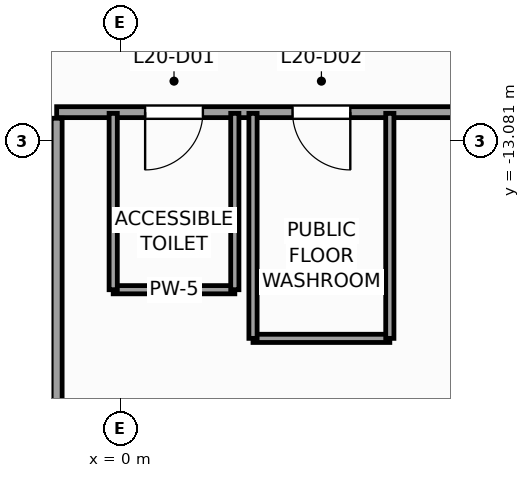
"""IFC4 building model, lengths in metres.
Left out: names, types, materials, properties, quantities, classifications, styles, units other than length and angle.
Written with IfcOpenShell. Run it as: python <this file> out.ifc"""

import sys

from ifc_helpers import new_model, si_unit, direction, frame, frame_2d, origin, place, context, subcontext, project, spatial, rectangle, extrude, source, transform, mapped, element, fill, save


model = new_model("IFC4")
c1 = context("Model", 3, precision=1e-05, world=origin(), true_north=direction((0.0, 1.0)))
c2 = subcontext(c1, "Body", "Model", "MODEL_VIEW")
j1 = project(units=[si_unit("LENGTHUNIT", "METRE"), si_unit("PLANEANGLEUNIT", "RADIAN")], contexts=[c1])
p1 = place(None, origin())
s1 = spatial("IfcSite", under=j1, at=p1, CompositionType="ELEMENT")
p2 = place(p1, origin())
s2 = spatial("IfcBuilding", under=s1, at=p2, CompositionType="ELEMENT")
p3 = place(p2, frame((0.0, 0.0, 87.2)))
s3 = spatial("IfcBuildingStorey", under=s2, at=p3, CompositionType="ELEMENT", Elevation=87.2)
p4 = place(p3, frame((-1.05, -12.6, 0.0), z_axis=(0.0, 0.0, 1.0), x_axis=(1.0, 0.0, 0.0)))
e1 = element("IfcWall", 1, at=p4, inside=s3, PredefinedType="PARTITIONING", context=c2, shape_type="SweptSolid", body=[
    extrude(rectangle(XDim=11.5, YDim=0.18, at=frame_2d((5.75, 0.0))), origin(), (0.0, 0.0, 1.0), 3.74),
])
p5 = place(p4, frame((1.455, 0.0, 0.0)))
e2 = element("IfcOpeningElement", 2, at=p5, cuts=e1, PredefinedType="OPENING", context=c2, shape_type="SweptSolid", body=[
    extrude(rectangle(XDim=0.95, YDim=2.1, at=frame_2d((0.475, 1.05))), frame((0.0, 0.1, 0.0), z_axis=(0.0, -1.0, 0.0), x_axis=(1.0, 0.0, 0.0)), (0.0, 0.0, 1.0), 0.2),
])
p6 = place(p4, frame((3.879, 0.0, 0.0)))
e3 = element("IfcOpeningElement", 3, at=p6, cuts=e1, PredefinedType="OPENING", context=c2, shape_type="SweptSolid", body=[
    extrude(rectangle(XDim=0.95, YDim=2.1, at=frame_2d((0.475, 1.05))), frame((0.0, 0.1, 0.0), z_axis=(0.0, -1.0, 0.0), x_axis=(1.0, 0.0, 0.0)), (0.0, 0.0, 1.0), 0.2),
])
p7 = place(p3, frame((-1.05, -28.487, 0.0), z_axis=(0.0, 0.0, 1.0), x_axis=(0.0, 1.0, 0.0)))
e4 = element("IfcWall", 4, at=p7, inside=s3, PredefinedType="PARTITIONING", context=c2, shape_type="SweptSolid", body=[
    extrude(rectangle(XDim=15.787, YDim=0.18, at=frame_2d((7.894, 0.0))), origin(), (0.0, 0.0, 1.0), 3.41),
])
p8 = place(p3, frame((-0.12, -15.52, 0.0), z_axis=(0.0, 0.0, 1.0), x_axis=(1.0, 0.0, 0.0)))
e5 = element("IfcWall", 5, at=p8, inside=s3, PredefinedType="PARTITIONING", context=c2, shape_type="SweptSolid", body=[
    extrude(rectangle(XDim=2.0, YDim=0.135, at=frame_2d((1.0, 0.0))), origin(), (0.0, 0.0, 1.0), 3.24),
])
for number, where, z_axis, x_axis in (
    (6, (1.88, -15.52, 0.0), (0.0, 0.0, 1.0), (0.0, 1.0, 0.0)),
    (7, (-0.12, -15.52, 0.0), (0.0, 0.0, 1.0), (0.0, 1.0, 0.0)),
):
    element("IfcWall", number, at=place(p3, frame(where, z_axis=z_axis, x_axis=x_axis)), inside=s3, PredefinedType="PARTITIONING", context=c2, shape_type="SweptSolid", body=[
        extrude(rectangle(XDim=2.9, YDim=0.135, at=frame_2d((1.45, 0.0))), origin(), (0.0, 0.0, 1.0), 3.74),
    ])
p9 = place(p3, frame((2.179, -16.32, 0.0), z_axis=(0.0, 0.0, 1.0), x_axis=(1.0, 0.0, 0.0)))
e8 = element("IfcWall", 8, at=p9, inside=s3, PredefinedType="PARTITIONING", context=c2, shape_type="SweptSolid", body=[
    extrude(rectangle(XDim=2.25, YDim=0.135, at=frame_2d((1.125, 0.0))), origin(), (0.0, 0.0, 1.0), 3.74),
])
for number, where, z_axis, x_axis in (
    (9, (4.429, -16.32, 0.0), (0.0, 0.0, 1.0), (0.0, 1.0, 0.0)),
    (10, (2.179, -16.32, 0.0), (0.0, 0.0, 1.0), (0.0, 1.0, 0.0)),
):
    element("IfcWall", number, at=place(p3, frame(where, z_axis=z_axis, x_axis=x_axis)), inside=s3, PredefinedType="PARTITIONING", context=c2, shape_type="SweptSolid", body=[
        extrude(rectangle(XDim=3.7, YDim=0.135, at=frame_2d((1.85, 0.0))), origin(), (0.0, 0.0, 1.0), 3.74),
    ])
m1 = source(origin(), c2, "Body", "SweptSolid", [
    extrude(rectangle(XDim=0.95, YDim=2.1, at=frame_2d((0.475, 1.05))), frame((0.0, 0.025, 0.0), z_axis=(0.0, -1.0, 0.0), x_axis=(1.0, 0.0, 0.0)), (0.0, 0.0, 1.0), 0.05),
])
p10 = place(p5, frame((0.95, 0.0, 0.0), z_axis=(0.0, 0.0, 1.0), x_axis=(-1.0, 0.0, 0.0)))
e11 = element("IfcDoor", 11, at=p10, inside=s3, OperationType="SINGLE_SWING_LEFT", PredefinedType="DOOR", context=c2, shape_type="MappedRepresentation", body=[
    mapped(m1, transform((0.0, 0.0, 0.0), scale=1.0)),
])
fill(e2, e11)
p11 = place(p6, frame((0.95, 0.0, 0.0), z_axis=(0.0, 0.0, 1.0), x_axis=(-1.0, 0.0, 0.0)))
e12 = element("IfcDoor", 12, at=p11, inside=s3, OperationType="SINGLE_SWING_RIGHT", PredefinedType="DOOR", context=c2, shape_type="MappedRepresentation", body=[
    mapped(m1, transform((0.0, 0.0, 0.0), scale=1.0)),
])
fill(e3, e12)
save(model, sys.argv[1])
